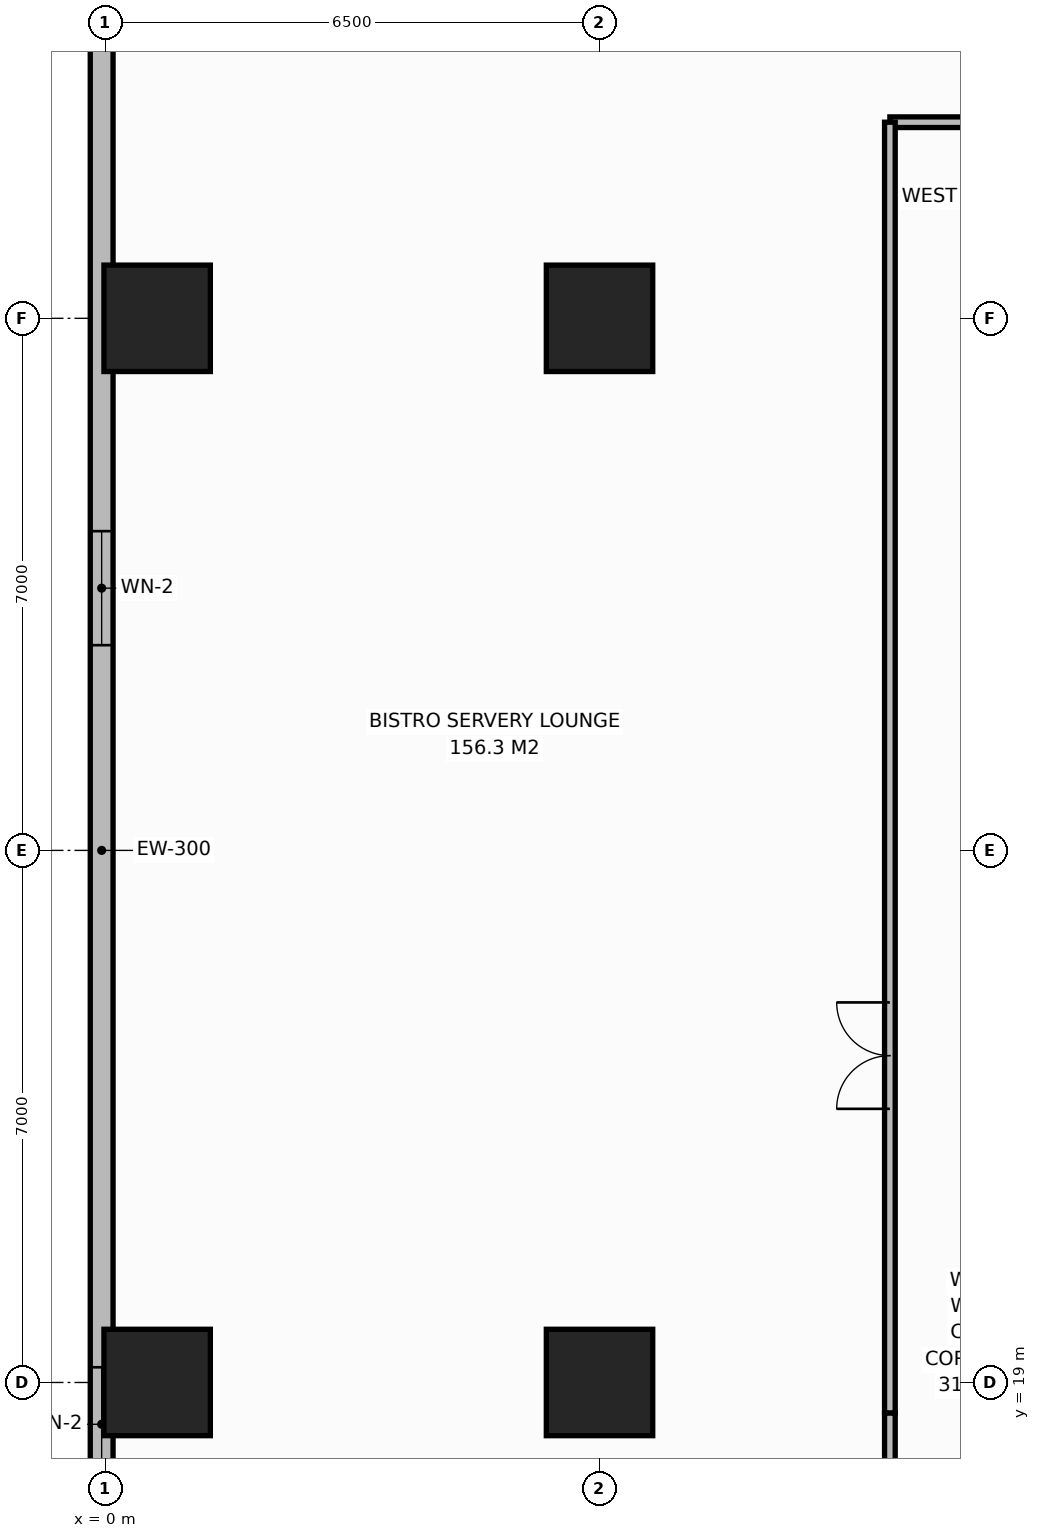
"""IFC4 building model, lengths in metres.
Left out: names, types, materials, properties, quantities, classifications, styles, units other than length and angle.
Written with IfcOpenShell. Run it as: python <this file> out.ifc"""

import sys

from ifc_helpers import new_model, si_unit, direction, frame, frame_2d, origin, origin_2d, place, context, subcontext, project, spatial, rectangle, extrude, element, fill, save


model = new_model("IFC4")
c1 = context("Model", 3, precision=1e-05, world=origin(), true_north=direction((0.0, 1.0)))
c2 = subcontext(c1, "Body", "Model", "MODEL_VIEW")
j1 = project(units=[si_unit("LENGTHUNIT", "METRE"), si_unit("PLANEANGLEUNIT", "RADIAN")], contexts=[c1])
p1 = place(None, origin())
s1 = spatial("IfcSite", under=j1, at=p1, CompositionType="ELEMENT")
p2 = place(p1, origin())
s2 = spatial("IfcBuilding", under=s1, at=p2, CompositionType="ELEMENT")
p3 = place(p2, frame((0.0, 0.0, 17.0)))
s3 = spatial("IfcBuildingStorey", under=s2, at=p3, CompositionType="ELEMENT", Elevation=17.0)
for number, where, z_axis, x_axis in (
    (1, (6.5, 19.0, 0.0), (0.0, 0.0, 1.0), (1.0, 0.0, 0.0)),
    (2, (6.5, 33.0, 0.0), (0.0, 0.0, 1.0), (1.0, 0.0, 0.0)),
    (3, (0.68, 19.0, 0.0), (0.0, 0.0, 1.0), (1.0, 0.0, 0.0)),
    (4, (0.68, 33.0, 0.0), (0.0, 0.0, 1.0), (1.0, 0.0, 0.0)),
):
    element("IfcColumn", number, at=place(p3, frame(where, z_axis=z_axis, x_axis=x_axis)), inside=s3, PredefinedType="COLUMN", context=c2, shape_type="SweptSolid", body=[
        extrude(rectangle(XDim=1.4, YDim=1.4, at=origin_2d()), origin(), (0.0, 0.0, 1.0), 5.0),
    ])
p4 = place(p3, frame((-0.05, 3.2, 0.0), z_axis=(0.0, 0.0, 1.0), x_axis=(0.0, 1.0, 0.0)))
e5 = element("IfcWall", 5, at=p4, inside=s3, PredefinedType="STANDARD", context=c2, shape_type="SweptSolid", body=[
    extrude(rectangle(XDim=45.6, YDim=0.3, at=frame_2d((22.8, 0.0))), origin(), (0.0, 0.0, 1.0), 4.4),
])
p5 = place(p4, frame((5.0, 0.0, 0.9)))
e6 = element("IfcOpeningElement", 6, at=p5, cuts=e5, PredefinedType="OPENING", context=c2, shape_type="SweptSolid", body=[
    extrude(rectangle(XDim=1.5, YDim=2.2, at=frame_2d((0.75, 1.1))), frame((0.0, 0.16, 0.0), z_axis=(0.0, -1.0, 0.0), x_axis=(1.0, 0.0, 0.0)), (0.0, 0.0, 1.0), 0.32),
])
p6 = place(p4, frame((14.5, 0.0, 0.9)))
e7 = element("IfcOpeningElement", 7, at=p6, cuts=e5, PredefinedType="OPENING", context=c2, shape_type="SweptSolid", body=[
    extrude(rectangle(XDim=1.5, YDim=2.2, at=frame_2d((0.75, 1.1))), frame((0.0, 0.16, 0.0), z_axis=(0.0, -1.0, 0.0), x_axis=(1.0, 0.0, 0.0)), (0.0, 0.0, 1.0), 0.32),
])
p7 = place(p4, frame((25.5, 0.0, 0.9)))
e8 = element("IfcOpeningElement", 8, at=p7, cuts=e5, PredefinedType="OPENING", context=c2, shape_type="SweptSolid", body=[
    extrude(rectangle(XDim=1.5, YDim=2.2, at=frame_2d((0.75, 1.1))), frame((0.0, 0.16, 0.0), z_axis=(0.0, -1.0, 0.0), x_axis=(1.0, 0.0, 0.0)), (0.0, 0.0, 1.0), 0.32),
])
p8 = place(p4, frame((35.0, 0.0, 0.9)))
e9 = element("IfcOpeningElement", 9, at=p8, cuts=e5, PredefinedType="OPENING", context=c2, shape_type="SweptSolid", body=[
    extrude(rectangle(XDim=1.5, YDim=2.2, at=frame_2d((0.75, 1.1))), frame((0.0, 0.16, 0.0), z_axis=(0.0, -1.0, 0.0), x_axis=(1.0, 0.0, 0.0)), (0.0, 0.0, 1.0), 0.32),
])
p9 = place(p3, frame((10.32, 35.58, 0.0), z_axis=(0.0, 0.0, 1.0), x_axis=(1.0, 0.0, 0.0)))
e10 = element("IfcWall", 10, at=p9, inside=s3, PredefinedType="PARTITIONING", context=c2, shape_type="SweptSolid", body=[
    extrude(rectangle(XDim=15.6, YDim=0.14, at=frame_2d((7.8, 0.0))), origin(), (0.0, 0.0, 1.0), 4.4),
])
p10 = place(p9, frame((10.78, 0.0, 0.0)))
e11 = element("IfcOpeningElement", 11, at=p10, cuts=e10, PredefinedType="OPENING", context=c2, shape_type="SweptSolid", body=[
    extrude(rectangle(XDim=0.9, YDim=2.15, at=frame_2d((0.45, 1.075))), frame((0.0, 0.08, 0.0), z_axis=(0.0, -1.0, 0.0), x_axis=(1.0, 0.0, 0.0)), (0.0, 0.0, 1.0), 0.16),
])
p11 = place(p9, frame((13.63, 0.0, 0.0)))
e12 = element("IfcOpeningElement", 12, at=p11, cuts=e10, PredefinedType="OPENING", context=c2, shape_type="SweptSolid", body=[
    extrude(rectangle(XDim=0.9, YDim=2.15, at=frame_2d((0.45, 1.075))), frame((0.0, 0.08, 0.0), z_axis=(0.0, -1.0, 0.0), x_axis=(1.0, 0.0, 0.0)), (0.0, 0.0, 1.0), 0.16),
])
p12 = place(p9, frame((3.5, 0.0, 0.0)))
e13 = element("IfcOpeningElement", 13, at=p12, cuts=e10, PredefinedType="OPENING", context=c2, shape_type="SweptSolid", body=[
    extrude(rectangle(XDim=1.4, YDim=2.2, at=frame_2d((0.7, 1.1))), frame((0.0, 0.08, 0.0), z_axis=(0.0, -1.0, 0.0), x_axis=(1.0, 0.0, 0.0)), (0.0, 0.0, 1.0), 0.16),
])
p13 = place(p3, frame((10.32, 16.42, 0.0), z_axis=(0.0, 0.0, 1.0), x_axis=(0.0, 1.0, 0.0)))
e14 = element("IfcWall", 14, at=p13, inside=s3, PredefinedType="PARTITIONING", context=c2, shape_type="SweptSolid", body=[
    extrude(rectangle(XDim=2.18, YDim=0.14, at=frame_2d((1.09, 0.0))), origin(), (0.0, 0.0, 1.0), 4.4),
])
p14 = place(p3, frame((10.32, 18.6, 0.0), z_axis=(0.0, 0.0, 1.0), x_axis=(0.0, 1.0, 0.0)))
e15 = element("IfcWall", 15, at=p14, inside=s3, PredefinedType="PARTITIONING", context=c2, shape_type="SweptSolid", body=[
    extrude(rectangle(XDim=16.98, YDim=0.14, at=frame_2d((8.49, 0.0))), origin(), (0.0, 0.0, 1.0), 4.4),
])
p15 = place(p14, frame((4.0, 0.0, 0.0)))
e16 = element("IfcOpeningElement", 16, at=p15, cuts=e15, PredefinedType="OPENING", context=c2, shape_type="SweptSolid", body=[
    extrude(rectangle(XDim=1.4, YDim=2.2, at=frame_2d((0.7, 1.1))), frame((0.0, 0.08, 0.0), z_axis=(0.0, -1.0, 0.0), x_axis=(1.0, 0.0, 0.0)), (0.0, 0.0, 1.0), 0.16),
])
p16 = place(p6, origin())
e17 = element("IfcWindow", 17, at=p16, inside=s3, PartitioningType="SINGLE_PANEL", PredefinedType="WINDOW", context=c2, shape_type="SweptSolid", body=[
    extrude(rectangle(XDim=1.5, YDim=2.2, at=frame_2d((0.75, 1.1))), frame((0.0, 0.03, 0.0), z_axis=(0.0, -1.0, 0.0), x_axis=(1.0, 0.0, 0.0)), (0.0, 0.0, 1.0), 0.06),
])
fill(e7, e17)
p17 = place(p7, origin())
e18 = element("IfcWindow", 18, at=p17, inside=s3, PartitioningType="SINGLE_PANEL", PredefinedType="WINDOW", context=c2, shape_type="SweptSolid", body=[
    extrude(rectangle(XDim=1.5, YDim=2.2, at=frame_2d((0.75, 1.1))), frame((0.0, 0.03, 0.0), z_axis=(0.0, -1.0, 0.0), x_axis=(1.0, 0.0, 0.0)), (0.0, 0.0, 1.0), 0.06),
])
fill(e8, e18)
p18 = place(p15, origin())
e19 = element("IfcDoor", 19, at=p18, inside=s3, OperationType="DOUBLE_DOOR_SINGLE_SWING", PredefinedType="DOOR", context=c2, shape_type="SweptSolid", body=[
    extrude(rectangle(XDim=1.4, YDim=2.2, at=frame_2d((0.7, 1.1))), frame((0.0, 0.025, 0.0), z_axis=(0.0, -1.0, 0.0), x_axis=(1.0, 0.0, 0.0)), (0.0, 0.0, 1.0), 0.05),
])
fill(e16, e19)
save(model, sys.argv[1])
